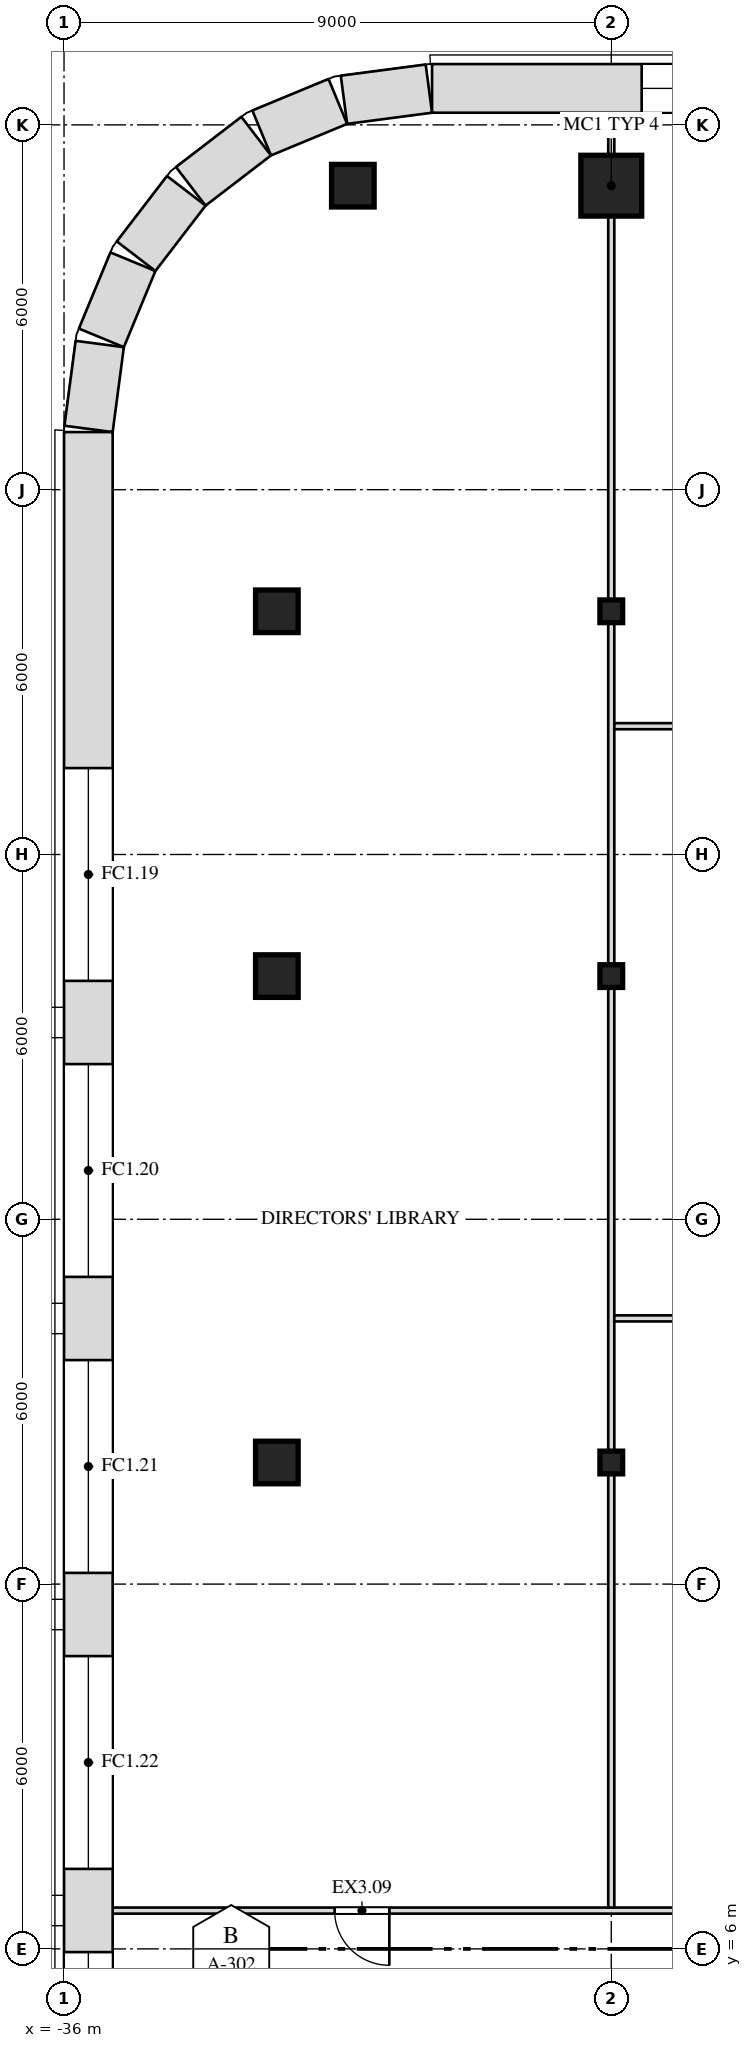
"""IFC4 building model, lengths in metres.
Left out: names, types, materials, properties, quantities, classifications, styles, units other than length and angle.
Written with IfcOpenShell. Run it as: python <this file> out.ifc"""

import sys

from ifc_helpers import new_model, si_unit, direction, frame, frame_2d, origin, origin_2d, place, context, subcontext, project, spatial, rectangle, i_section, extrude, element, fill, save


model = new_model("IFC4")
c1 = context("Model", 3, precision=1e-05, world=origin(), true_north=direction((0.0, 1.0)))
c2 = subcontext(c1, "Body", "Model", "MODEL_VIEW")
j1 = project(units=[si_unit("LENGTHUNIT", "METRE"), si_unit("PLANEANGLEUNIT", "RADIAN")], contexts=[c1])
p1 = place(None, origin())
s1 = spatial("IfcSite", under=j1, at=p1, CompositionType="ELEMENT")
p2 = place(p1, origin())
s2 = spatial("IfcBuilding", under=s1, at=p2, CompositionType="ELEMENT")
p3 = place(p2, frame((0.0, 0.0, 280.5)))
s3 = spatial("IfcBuildingStorey", under=s2, at=p3, CompositionType="ELEMENT", Elevation=280.5)
p4 = place(p3, frame((-32.5, 14.0, 0.0), z_axis=(0.0, 0.0, 1.0), x_axis=(1.0, 0.0, 0.0)))
e1 = element("IfcColumn", 1, at=p4, inside=s3, PredefinedType="COLUMN", context=c2, shape_type="SweptSolid", body=[
    extrude(rectangle(XDim=0.7, YDim=0.7, at=origin_2d()), origin(), (0.0, 0.0, 1.0), 4.0),
])
p5 = place(p3, frame((-27.0, 14.0, 0.0), z_axis=(0.0, 0.0, 1.0), x_axis=(1.0, 0.0, 0.0)))
e2 = element("IfcColumn", 2, at=p5, inside=s3, PredefinedType="COLUMN", context=c2, shape_type="SweptSolid", body=[
    extrude(i_section(OverallWidth=0.373, OverallDepth=0.373, WebThickness=0.016, FlangeThickness=0.026, at=origin_2d()), origin(), (0.0, 0.0, 1.0), 4.0),
])
p6 = place(p3, frame((-32.5, 22.0, 0.0), z_axis=(0.0, 0.0, 1.0), x_axis=(1.0, 0.0, 0.0)))
e3 = element("IfcColumn", 3, at=p6, inside=s3, PredefinedType="COLUMN", context=c2, shape_type="SweptSolid", body=[
    extrude(rectangle(XDim=0.7, YDim=0.7, at=origin_2d()), origin(), (0.0, 0.0, 1.0), 4.0),
])
p7 = place(p3, frame((-27.0, 22.0, 0.0), z_axis=(0.0, 0.0, 1.0), x_axis=(1.0, 0.0, 0.0)))
e4 = element("IfcColumn", 4, at=p7, inside=s3, PredefinedType="COLUMN", context=c2, shape_type="SweptSolid", body=[
    extrude(i_section(OverallWidth=0.373, OverallDepth=0.373, WebThickness=0.016, FlangeThickness=0.026, at=origin_2d()), origin(), (0.0, 0.0, 1.0), 4.0),
])
p8 = place(p3, frame((-32.5, 28.0, 0.0), z_axis=(0.0, 0.0, 1.0), x_axis=(1.0, 0.0, 0.0)))
e5 = element("IfcColumn", 5, at=p8, inside=s3, PredefinedType="COLUMN", context=c2, shape_type="SweptSolid", body=[
    extrude(rectangle(XDim=0.7, YDim=0.7, at=origin_2d()), origin(), (0.0, 0.0, 1.0), 4.0),
])
p9 = place(p3, frame((-27.0, 28.0, 0.0), z_axis=(0.0, 0.0, 1.0), x_axis=(1.0, 0.0, 0.0)))
e6 = element("IfcColumn", 6, at=p9, inside=s3, PredefinedType="COLUMN", context=c2, shape_type="SweptSolid", body=[
    extrude(i_section(OverallWidth=0.373, OverallDepth=0.373, WebThickness=0.016, FlangeThickness=0.026, at=origin_2d()), origin(), (0.0, 0.0, 1.0), 4.0),
])
p10 = place(p3, frame((-31.25, 35.0, 0.0), z_axis=(0.0, 0.0, 1.0), x_axis=(1.0, 0.0, 0.0)))
e7 = element("IfcColumn", 7, at=p10, inside=s3, PredefinedType="COLUMN", context=c2, shape_type="SweptSolid", body=[
    extrude(rectangle(XDim=0.7, YDim=0.7, at=origin_2d()), origin(), (0.0, 0.0, 1.0), 4.0),
])
p11 = place(p3, frame((-27.0, 35.0, 0.0), z_axis=(0.0, 0.0, 1.0), x_axis=(1.0, 0.0, 0.0)))
e8 = element("IfcColumn", 8, at=p11, inside=s3, PredefinedType="COLUMN", context=c2, shape_type="SweptSolid", body=[
    extrude(rectangle(XDim=1.0, YDim=1.0, at=origin_2d()), origin(), (0.0, 0.0, 1.0), 4.0),
])
p12 = place(p3, frame((-35.2, 6.63, 0.0), z_axis=(0.0, 0.0, 1.0), x_axis=(1.0, 0.0, 0.0)))
e9 = element("IfcWall", 9, at=p12, inside=s3, PredefinedType="PARTITIONING", context=c2, shape_type="SweptSolid", body=[
    extrude(rectangle(XDim=20.15, YDim=0.1, at=frame_2d((10.075, 0.0))), origin(), (0.0, 0.0, 1.0), 3.78),
])
p13 = place(p12, frame((3.65, 0.0, 0.0)))
e10 = element("IfcOpeningElement", 10, at=p13, cuts=e9, PredefinedType="OPENING", context=c2, shape_type="SweptSolid", body=[
    extrude(rectangle(XDim=0.9, YDim=2.1, at=frame_2d((0.45, 1.05))), frame((0.0, 0.062, 0.0), z_axis=(0.0, -1.0, 0.0), x_axis=(1.0, 0.0, 0.0)), (0.0, 0.0, 1.0), 0.124),
])
p14 = place(p3, frame((-27.0, 6.68, 0.0), z_axis=(0.0, 0.0, 1.0), x_axis=(0.0, 1.0, 0.0)))
e11 = element("IfcWall", 11, at=p14, inside=s3, PredefinedType="PARTITIONING", context=c2, shape_type="SweptSolid", body=[
    extrude(rectangle(XDim=7.133, YDim=0.1, at=frame_2d((3.567, 0.0))), origin(), (0.0, 0.0, 1.0), 2.848),
])
p15 = place(p3, frame((-27.0, 14.187, 0.0), z_axis=(0.0, 0.0, 1.0), x_axis=(0.0, 1.0, 0.0)))
e12 = element("IfcWall", 12, at=p15, inside=s3, PredefinedType="PARTITIONING", context=c2, shape_type="SweptSolid", body=[
    extrude(rectangle(XDim=7.626, YDim=0.1, at=frame_2d((3.813, 0.0))), origin(), (0.0, 0.0, 1.0), 2.848),
])
p16 = place(p3, frame((-27.0, 22.187, 0.0), z_axis=(0.0, 0.0, 1.0), x_axis=(0.0, 1.0, 0.0)))
e13 = element("IfcWall", 13, at=p16, inside=s3, PredefinedType="PARTITIONING", context=c2, shape_type="SweptSolid", body=[
    extrude(rectangle(XDim=5.626, YDim=0.1, at=frame_2d((2.813, 0.0))), origin(), (0.0, 0.0, 1.0), 2.848),
])
p17 = place(p3, frame((-27.0, 28.187, 0.0), z_axis=(0.0, 0.0, 1.0), x_axis=(0.0, 1.0, 0.0)))
e14 = element("IfcWall", 14, at=p17, inside=s3, PredefinedType="PARTITIONING", context=c2, shape_type="SweptSolid", body=[
    extrude(rectangle(XDim=6.313, YDim=0.1, at=frame_2d((3.157, 0.0))), origin(), (0.0, 0.0, 1.0), 2.848),
])
p18 = place(p3, frame((-27.0, 35.5, 0.0), z_axis=(0.0, 0.0, 1.0), x_axis=(0.0, 1.0, 0.0)))
e15 = element("IfcWall", 15, at=p18, inside=s3, PredefinedType="PARTITIONING", context=c2, shape_type="SweptSolid", body=[
    extrude(rectangle(XDim=0.7, YDim=0.1, at=frame_2d((0.35, 0.0))), origin(), (0.0, 0.0, 1.0), 3.78),
])
for number, where, z_axis, x_axis in (
    (16, (-26.95, 16.37, 0.0), (0.0, 0.0, 1.0), (1.0, 0.0, 0.0)),
    (17, (-26.95, 26.11, 0.0), (0.0, 0.0, 1.0), (1.0, 0.0, 0.0)),
):
    element("IfcWall", number, at=place(p3, frame(where, z_axis=z_axis, x_axis=x_axis)), inside=s3, PredefinedType="PARTITIONING", context=c2, shape_type="SweptSolid", body=[
        extrude(rectangle(XDim=11.9, YDim=0.1, at=frame_2d((5.95, 0.0))), origin(), (0.0, 0.0, 1.0), 3.78),
    ])
p19 = place(p3, frame((29.948, 36.6, 0.0), z_axis=(0.0, 0.0, 1.0), x_axis=(-1.0, 0.0, 0.0)))
e18 = element("IfcWall", 18, at=p19, inside=s3, PredefinedType="SOLIDWALL", context=c2, shape_type="SweptSolid", body=[
    extrude(rectangle(XDim=59.895, YDim=0.8, at=frame_2d((29.948, 0.0))), origin(), (0.0, 0.0, 1.0), 3.78),
])
p20 = place(p19, frame((3.448, 0.0, 1.0)))
e19 = element("IfcOpeningElement", 19, at=p20, cuts=e18, PredefinedType="OPENING", context=c2, shape_type="SweptSolid", body=[
    extrude(rectangle(XDim=3.5, YDim=2.5, at=frame_2d((1.75, 1.25))), frame((0.0, 0.412, 0.0), z_axis=(0.0, -1.0, 0.0), x_axis=(1.0, 0.0, 0.0)), (0.0, 0.0, 1.0), 0.824),
])
p21 = place(p19, frame((7.948, 0.0, 1.0)))
e20 = element("IfcOpeningElement", 20, at=p21, cuts=e18, PredefinedType="OPENING", context=c2, shape_type="SweptSolid", body=[
    extrude(rectangle(XDim=3.5, YDim=2.5, at=frame_2d((1.75, 1.25))), frame((0.0, 0.412, 0.0), z_axis=(0.0, -1.0, 0.0), x_axis=(1.0, 0.0, 0.0)), (0.0, 0.0, 1.0), 0.824),
])
p22 = place(p19, frame((12.448, 0.0, 1.0)))
e21 = element("IfcOpeningElement", 21, at=p22, cuts=e18, PredefinedType="OPENING", context=c2, shape_type="SweptSolid", body=[
    extrude(rectangle(XDim=3.5, YDim=2.5, at=frame_2d((1.75, 1.25))), frame((0.0, 0.412, 0.0), z_axis=(0.0, -1.0, 0.0), x_axis=(1.0, 0.0, 0.0)), (0.0, 0.0, 1.0), 0.824),
])
p23 = place(p19, frame((16.948, 0.0, 1.0)))
e22 = element("IfcOpeningElement", 22, at=p23, cuts=e18, PredefinedType="OPENING", context=c2, shape_type="SweptSolid", body=[
    extrude(rectangle(XDim=3.5, YDim=2.5, at=frame_2d((1.75, 1.25))), frame((0.0, 0.412, 0.0), z_axis=(0.0, -1.0, 0.0), x_axis=(1.0, 0.0, 0.0)), (0.0, 0.0, 1.0), 0.824),
])
p24 = place(p19, frame((21.448, 0.0, 1.0)))
e23 = element("IfcOpeningElement", 23, at=p24, cuts=e18, PredefinedType="OPENING", context=c2, shape_type="SweptSolid", body=[
    extrude(rectangle(XDim=3.5, YDim=2.5, at=frame_2d((1.75, 1.25))), frame((0.0, 0.412, 0.0), z_axis=(0.0, -1.0, 0.0), x_axis=(1.0, 0.0, 0.0)), (0.0, 0.0, 1.0), 0.824),
])
p25 = place(p19, frame((25.948, 0.0, 1.0)))
e24 = element("IfcOpeningElement", 24, at=p25, cuts=e18, PredefinedType="OPENING", context=c2, shape_type="SweptSolid", body=[
    extrude(rectangle(XDim=3.5, YDim=2.5, at=frame_2d((1.75, 1.25))), frame((0.0, 0.412, 0.0), z_axis=(0.0, -1.0, 0.0), x_axis=(1.0, 0.0, 0.0)), (0.0, 0.0, 1.0), 0.824),
])
p26 = place(p19, frame((30.448, 0.0, 1.0)))
e25 = element("IfcOpeningElement", 25, at=p26, cuts=e18, PredefinedType="OPENING", context=c2, shape_type="SweptSolid", body=[
    extrude(rectangle(XDim=3.5, YDim=2.5, at=frame_2d((1.75, 1.25))), frame((0.0, 0.412, 0.0), z_axis=(0.0, -1.0, 0.0), x_axis=(1.0, 0.0, 0.0)), (0.0, 0.0, 1.0), 0.824),
])
p27 = place(p19, frame((34.948, 0.0, 1.0)))
e26 = element("IfcOpeningElement", 26, at=p27, cuts=e18, PredefinedType="OPENING", context=c2, shape_type="SweptSolid", body=[
    extrude(rectangle(XDim=3.5, YDim=2.5, at=frame_2d((1.75, 1.25))), frame((0.0, 0.412, 0.0), z_axis=(0.0, -1.0, 0.0), x_axis=(1.0, 0.0, 0.0)), (0.0, 0.0, 1.0), 0.824),
])
p28 = place(p19, frame((39.448, 0.0, 1.0)))
e27 = element("IfcOpeningElement", 27, at=p28, cuts=e18, PredefinedType="OPENING", context=c2, shape_type="SweptSolid", body=[
    extrude(rectangle(XDim=3.5, YDim=2.5, at=frame_2d((1.75, 1.25))), frame((0.0, 0.412, 0.0), z_axis=(0.0, -1.0, 0.0), x_axis=(1.0, 0.0, 0.0)), (0.0, 0.0, 1.0), 0.824),
])
p29 = place(p19, frame((43.948, 0.0, 1.0)))
e28 = element("IfcOpeningElement", 28, at=p29, cuts=e18, PredefinedType="OPENING", context=c2, shape_type="SweptSolid", body=[
    extrude(rectangle(XDim=3.5, YDim=2.5, at=frame_2d((1.75, 1.25))), frame((0.0, 0.412, 0.0), z_axis=(0.0, -1.0, 0.0), x_axis=(1.0, 0.0, 0.0)), (0.0, 0.0, 1.0), 0.824),
])
p30 = place(p19, frame((48.448, 0.0, 1.0)))
e29 = element("IfcOpeningElement", 29, at=p30, cuts=e18, PredefinedType="OPENING", context=c2, shape_type="SweptSolid", body=[
    extrude(rectangle(XDim=3.5, YDim=2.5, at=frame_2d((1.75, 1.25))), frame((0.0, 0.412, 0.0), z_axis=(0.0, -1.0, 0.0), x_axis=(1.0, 0.0, 0.0)), (0.0, 0.0, 1.0), 0.824),
])
p31 = place(p19, frame((52.948, 0.0, 1.0)))
e30 = element("IfcOpeningElement", 30, at=p31, cuts=e18, PredefinedType="OPENING", context=c2, shape_type="SweptSolid", body=[
    extrude(rectangle(XDim=3.5, YDim=2.5, at=frame_2d((1.75, 1.25))), frame((0.0, 0.412, 0.0), z_axis=(0.0, -1.0, 0.0), x_axis=(1.0, 0.0, 0.0)), (0.0, 0.0, 1.0), 0.824),
])
p32 = place(p3, frame((-30.0, 36.597, 0.0), z_axis=(0.0, 0.0, 1.0), x_axis=(-0.99144603414, -0.130517283865, 0.0)))
e31 = element("IfcWall", 31, at=p32, inside=s3, PredefinedType="SOLIDWALL", context=c2, shape_type="SweptSolid", body=[
    extrude(rectangle(XDim=1.408, YDim=0.8, at=frame_2d((0.704, 0.0))), origin(), (0.0, 0.0, 1.0), 3.78),
])
p33 = place(p3, frame((-31.497, 36.386, 0.0), z_axis=(0.0, 0.0, 1.0), x_axis=(-0.923847774587, -0.38276009378, 0.0)))
e32 = element("IfcWall", 32, at=p33, inside=s3, PredefinedType="SOLIDWALL", context=c2, shape_type="SweptSolid", body=[
    extrude(rectangle(XDim=1.355, YDim=0.8, at=frame_2d((0.678, 0.0))), origin(), (0.0, 0.0, 1.0), 3.78),
])
for number, where, z_axis, x_axis in (
    (33, (-32.84, 35.815, 0.0), (0.0, 0.0, 1.0), (-0.793, -0.609, 0.0)),
    (34, (-33.989, 34.916, 0.0), (0.0, 0.0, 1.0), (-0.609, -0.793, 0.0)),
):
    element("IfcWall", number, at=place(p3, frame(where, z_axis=z_axis, x_axis=x_axis)), inside=s3, PredefinedType="SOLIDWALL", context=c2, shape_type="SweptSolid", body=[
        extrude(rectangle(XDim=1.356, YDim=0.8, at=frame_2d((0.678, 0.0))), origin(), (0.0, 0.0, 1.0), 3.78),
    ])
p34 = place(p3, frame((-34.867, 33.75, 0.0), z_axis=(0.0, 0.0, 1.0), x_axis=(-0.38276009378, -0.923847774587, 0.0)))
e35 = element("IfcWall", 35, at=p34, inside=s3, PredefinedType="SOLIDWALL", context=c2, shape_type="SweptSolid", body=[
    extrude(rectangle(XDim=1.355, YDim=0.8, at=frame_2d((0.678, 0.0))), origin(), (0.0, 0.0, 1.0), 3.78),
])
p35 = place(p3, frame((-35.413, 32.396, 0.0), z_axis=(0.0, 0.0, 1.0), x_axis=(-0.130517283865, -0.99144603414, 0.0)))
e36 = element("IfcWall", 36, at=p35, inside=s3, PredefinedType="SOLIDWALL", context=c2, shape_type="SweptSolid", body=[
    extrude(rectangle(XDim=1.408, YDim=0.8, at=frame_2d((0.704, 0.0))), origin(), (0.0, 0.0, 1.0), 3.78),
])
p36 = place(p3, frame((-35.6, 30.948, 0.0), z_axis=(0.0, 0.0, 1.0), x_axis=(0.0, -1.0, 0.0)))
e37 = element("IfcWall", 37, at=p36, inside=s3, PredefinedType="SOLIDWALL", context=c2, shape_type="SweptSolid", body=[
    extrude(rectangle(XDim=38.895, YDim=0.8, at=frame_2d((19.448, 0.0))), origin(), (0.0, 0.0, 1.0), 3.78),
])
p37 = place(p36, frame((5.526, 0.0, 1.0)))
e38 = element("IfcOpeningElement", 38, at=p37, cuts=e37, PredefinedType="OPENING", context=c2, shape_type="SweptSolid", body=[
    extrude(rectangle(XDim=3.5, YDim=2.5, at=frame_2d((1.75, 1.25))), frame((0.0, 0.412, 0.0), z_axis=(0.0, -1.0, 0.0), x_axis=(1.0, 0.0, 0.0)), (0.0, 0.0, 1.0), 0.824),
])
p38 = place(p36, frame((10.395, 0.0, 1.0)))
e39 = element("IfcOpeningElement", 39, at=p38, cuts=e37, PredefinedType="OPENING", context=c2, shape_type="SweptSolid", body=[
    extrude(rectangle(XDim=3.5, YDim=2.5, at=frame_2d((1.75, 1.25))), frame((0.0, 0.412, 0.0), z_axis=(0.0, -1.0, 0.0), x_axis=(1.0, 0.0, 0.0)), (0.0, 0.0, 1.0), 0.824),
])
p39 = place(p36, frame((15.263, 0.0, 1.0)))
e40 = element("IfcOpeningElement", 40, at=p39, cuts=e37, PredefinedType="OPENING", context=c2, shape_type="SweptSolid", body=[
    extrude(rectangle(XDim=3.5, YDim=2.5, at=frame_2d((1.75, 1.25))), frame((0.0, 0.412, 0.0), z_axis=(0.0, -1.0, 0.0), x_axis=(1.0, 0.0, 0.0)), (0.0, 0.0, 1.0), 0.824),
])
p40 = place(p36, frame((20.132, 0.0, 1.0)))
e41 = element("IfcOpeningElement", 41, at=p40, cuts=e37, PredefinedType="OPENING", context=c2, shape_type="SweptSolid", body=[
    extrude(rectangle(XDim=3.5, YDim=2.5, at=frame_2d((1.75, 1.25))), frame((0.0, 0.412, 0.0), z_axis=(0.0, -1.0, 0.0), x_axis=(1.0, 0.0, 0.0)), (0.0, 0.0, 1.0), 0.824),
])
p41 = place(p36, frame((25.0, 0.0, 1.0)))
e42 = element("IfcOpeningElement", 42, at=p41, cuts=e37, PredefinedType="OPENING", context=c2, shape_type="SweptSolid", body=[
    extrude(rectangle(XDim=3.5, YDim=2.5, at=frame_2d((1.75, 1.25))), frame((0.0, 0.412, 0.0), z_axis=(0.0, -1.0, 0.0), x_axis=(1.0, 0.0, 0.0)), (0.0, 0.0, 1.0), 0.824),
])
p42 = place(p36, frame((29.869, 0.0, 1.0)))
e43 = element("IfcOpeningElement", 43, at=p42, cuts=e37, PredefinedType="OPENING", context=c2, shape_type="SweptSolid", body=[
    extrude(rectangle(XDim=3.5, YDim=2.5, at=frame_2d((1.75, 1.25))), frame((0.0, 0.412, 0.0), z_axis=(0.0, -1.0, 0.0), x_axis=(1.0, 0.0, 0.0)), (0.0, 0.0, 1.0), 0.824),
])
p43 = place(p13, origin())
e44 = element("IfcDoor", 44, at=p43, inside=s3, OperationType="SINGLE_SWING_LEFT", PredefinedType="DOOR", context=c2, shape_type="SweptSolid", body=[
    extrude(rectangle(XDim=0.9, YDim=2.1, at=frame_2d((0.45, 1.05))), frame((0.0, 0.025, 0.0), z_axis=(0.0, -1.0, 0.0), x_axis=(1.0, 0.0, 0.0)), (0.0, 0.0, 1.0), 0.05),
])
fill(e10, e44)
p44 = place(p31, origin())
e45 = element("IfcWindow", 45, at=p44, inside=s3, PartitioningType="SINGLE_PANEL", PredefinedType="WINDOW", context=c2, shape_type="SweptSolid", body=[
    extrude(rectangle(XDim=3.5, YDim=2.5, at=frame_2d((1.75, 1.25))), frame((0.0, 0.03, 0.0), z_axis=(0.0, -1.0, 0.0), x_axis=(1.0, 0.0, 0.0)), (0.0, 0.0, 1.0), 0.06),
])
fill(e30, e45)
p45 = place(p37, origin())
e46 = element("IfcWindow", 46, at=p45, inside=s3, PartitioningType="SINGLE_PANEL", PredefinedType="WINDOW", context=c2, shape_type="SweptSolid", body=[
    extrude(rectangle(XDim=3.5, YDim=2.5, at=frame_2d((1.75, 1.25))), frame((0.0, 0.03, 0.0), z_axis=(0.0, -1.0, 0.0), x_axis=(1.0, 0.0, 0.0)), (0.0, 0.0, 1.0), 0.06),
])
fill(e38, e46)
p46 = place(p38, origin())
e47 = element("IfcWindow", 47, at=p46, inside=s3, PartitioningType="SINGLE_PANEL", PredefinedType="WINDOW", context=c2, shape_type="SweptSolid", body=[
    extrude(rectangle(XDim=3.5, YDim=2.5, at=frame_2d((1.75, 1.25))), frame((0.0, 0.03, 0.0), z_axis=(0.0, -1.0, 0.0), x_axis=(1.0, 0.0, 0.0)), (0.0, 0.0, 1.0), 0.06),
])
fill(e39, e47)
p47 = place(p39, origin())
e48 = element("IfcWindow", 48, at=p47, inside=s3, PartitioningType="SINGLE_PANEL", PredefinedType="WINDOW", context=c2, shape_type="SweptSolid", body=[
    extrude(rectangle(XDim=3.5, YDim=2.5, at=frame_2d((1.75, 1.25))), frame((0.0, 0.03, 0.0), z_axis=(0.0, -1.0, 0.0), x_axis=(1.0, 0.0, 0.0)), (0.0, 0.0, 1.0), 0.06),
])
fill(e40, e48)
p48 = place(p40, origin())
e49 = element("IfcWindow", 49, at=p48, inside=s3, PartitioningType="SINGLE_PANEL", PredefinedType="WINDOW", context=c2, shape_type="SweptSolid", body=[
    extrude(rectangle(XDim=3.5, YDim=2.5, at=frame_2d((1.75, 1.25))), frame((0.0, 0.03, 0.0), z_axis=(0.0, -1.0, 0.0), x_axis=(1.0, 0.0, 0.0)), (0.0, 0.0, 1.0), 0.06),
])
fill(e41, e49)
p49 = place(p41, origin())
e50 = element("IfcWindow", 50, at=p49, inside=s3, PartitioningType="SINGLE_PANEL", PredefinedType="WINDOW", context=c2, shape_type="SweptSolid", body=[
    extrude(rectangle(XDim=3.5, YDim=2.5, at=frame_2d((1.75, 1.25))), frame((0.0, 0.03, 0.0), z_axis=(0.0, -1.0, 0.0), x_axis=(1.0, 0.0, 0.0)), (0.0, 0.0, 1.0), 0.06),
])
fill(e42, e50)
save(model, sys.argv[1])
